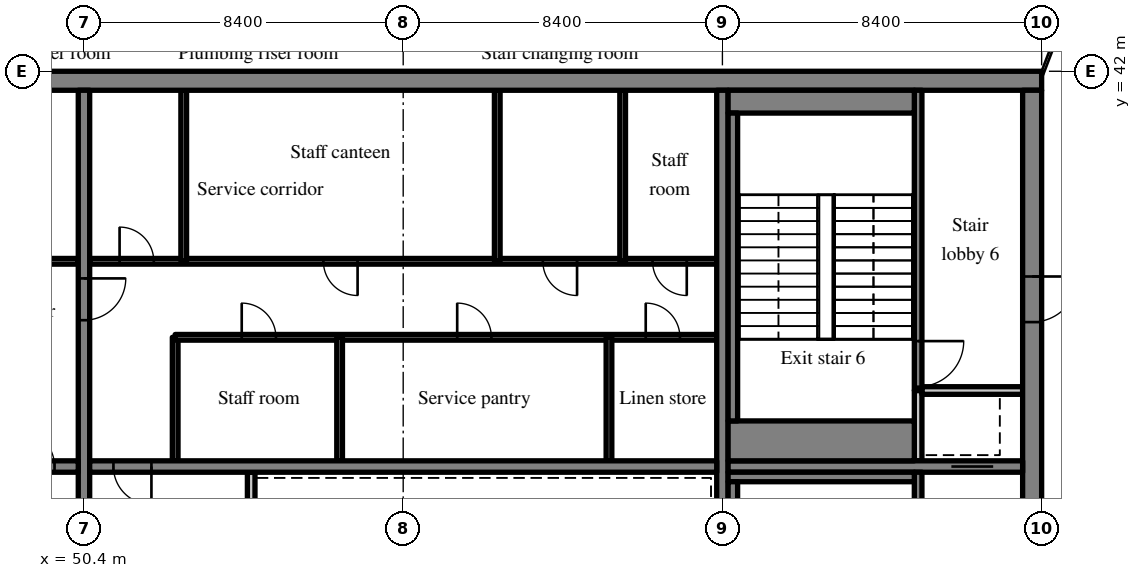
"""IFC4 building model, lengths in metres.
Left out: names, types, materials, properties, quantities, classifications, styles, units other than length and angle.
Written with IfcOpenShell. Run it as: python <this file> out.ifc"""

import sys

from ifc_helpers import new_model, si_unit, direction, frame, frame_2d, origin, place, context, subcontext, project, spatial, rectangle, extrude, source, transform, mapped, element, fill, save


model = new_model("IFC4")
c1 = context("Model", 3, precision=1e-05, world=origin(), true_north=direction((0.0, 1.0)))
c2 = subcontext(c1, "Body", "Model", "MODEL_VIEW")
j1 = project(units=[si_unit("LENGTHUNIT", "METRE"), si_unit("PLANEANGLEUNIT", "RADIAN")], contexts=[c1])
p1 = place(None, origin())
s1 = spatial("IfcSite", under=j1, at=p1, CompositionType="ELEMENT")
p2 = place(p1, origin())
s2 = spatial("IfcBuilding", under=s1, at=p2, CompositionType="ELEMENT")
p3 = place(p2, frame((0.0, 0.0, 289.7)))
s3 = spatial("IfcBuildingStorey", under=s2, at=p3, CompositionType="ELEMENT", Elevation=289.7)
m1 = source(origin(), c2, "Body", "SweptSolid", [
    extrude(rectangle(XDim=50.4, YDim=0.5, at=frame_2d((25.2, 0.0))), origin(), (0.0, 0.0, 1.0), 3.72),
])
p4 = place(p3, frame((25.2, 41.75, 0.0), z_axis=(0.0, 0.0, 1.0), x_axis=(1.0, 0.0, 0.0)))
e1 = element("IfcWall", 1, at=p4, inside=s3, PredefinedType="SHEAR", context=c2, shape_type="MappedRepresentation", body=[
    mapped(m1, transform((0.0, 0.0, 0.0), scale=1.0)),
])
m2 = source(origin(), c2, "Body", "SweptSolid", [
    extrude(rectangle(XDim=19.0, YDim=0.5, at=frame_2d((9.5, 0.0))), origin(), (0.0, 0.0, 1.0), 3.72),
])
p5 = place(p3, frame((75.35, 22.5, 0.0), z_axis=(0.0, 0.0, 1.0), x_axis=(0.0, 1.0, 0.0)))
e2 = element("IfcWall", 2, at=p5, inside=s3, PredefinedType="SHEAR", context=c2, shape_type="MappedRepresentation", body=[
    mapped(m2, transform((0.0, 0.0, 0.0), scale=1.0)),
])
m3 = source(origin(), c2, "Body", "SweptSolid", [
    extrude(rectangle(XDim=1.0, YDim=2.1, at=frame_2d((0.5, 1.05))), frame((0.0, 0.26, 0.0), z_axis=(0.0, -1.0, 0.0), x_axis=(1.0, 0.0, 0.0)), (0.0, 0.0, 1.0), 0.52),
])
p6 = place(p5, frame((3.0, 0.0, 0.0)))
e3 = element("IfcOpeningElement", 3, at=p6, cuts=e2, PredefinedType="OPENING", context=c2, shape_type="MappedRepresentation", body=[
    mapped(m3, transform((0.0, 0.0, 0.0), scale=1.0)),
])
m4 = source(origin(), c2, "Body", "SweptSolid", [
    extrude(rectangle(XDim=1.2, YDim=2.1, at=frame_2d((0.6, 1.05))), frame((0.0, 0.26, 0.0), z_axis=(0.0, -1.0, 0.0), x_axis=(1.0, 0.0, 0.0)), (0.0, 0.0, 1.0), 0.52),
])
p7 = place(p5, frame((12.9, 0.0, 0.0)))
e4 = element("IfcOpeningElement", 4, at=p7, cuts=e2, PredefinedType="OPENING", context=c2, shape_type="MappedRepresentation", body=[
    mapped(m4, transform((0.0, 0.0, 0.0), scale=1.0)),
])
m5 = source(origin(), c2, "Body", "SweptSolid", [
    extrude(rectangle(XDim=19.0, YDim=0.3, at=frame_2d((9.5, 0.0))), origin(), (0.0, 0.0, 1.0), 3.72),
])
p8 = place(p3, frame((50.4, 22.5, 0.0), z_axis=(0.0, 0.0, 1.0), x_axis=(0.0, 1.0, 0.0)))
e5 = element("IfcWall", 5, at=p8, inside=s3, PredefinedType="SHEAR", context=c2, shape_type="MappedRepresentation", body=[
    mapped(m5, transform((0.0, 0.0, 0.0), scale=1.0)),
])
m6 = source(origin(), c2, "Body", "SweptSolid", [
    extrude(rectangle(XDim=1.1, YDim=2.1, at=frame_2d((0.55, 1.05))), frame((0.0, 0.16, 0.0), z_axis=(0.0, -1.0, 0.0), x_axis=(1.0, 0.0, 0.0)), (0.0, 0.0, 1.0), 0.32),
])
p9 = place(p8, frame((12.95, 0.0, 0.0)))
e6 = element("IfcOpeningElement", 6, at=p9, cuts=e5, PredefinedType="OPENING", context=c2, shape_type="MappedRepresentation", body=[
    mapped(m6, transform((0.0, 0.0, 0.0), scale=1.0)),
])
p10 = place(p3, frame((67.2, 22.5, 0.0), z_axis=(0.0, 0.0, 1.0), x_axis=(0.0, 1.0, 0.0)))
e7 = element("IfcWall", 7, at=p10, inside=s3, PredefinedType="SHEAR", context=c2, shape_type="MappedRepresentation", body=[
    mapped(m5, transform((0.0, 0.0, 0.0), scale=1.0)),
])
m7 = source(origin(), c2, "Body", "SweptSolid", [
    extrude(rectangle(XDim=16.5, YDim=0.3, at=frame_2d((8.25, 0.0))), origin(), (0.0, 0.0, 1.0), 3.72),
])
p11 = place(p3, frame((33.75, 31.6, 0.0), z_axis=(0.0, 0.0, 1.0), x_axis=(1.0, 0.0, 0.0)))
e8 = element("IfcWall", 8, at=p11, inside=s3, PredefinedType="SHEAR", context=c2, shape_type="MappedRepresentation", body=[
    mapped(m7, transform((0.0, 0.0, 0.0), scale=1.0)),
])
m8 = source(origin(), c2, "Body", "SweptSolid", [
    extrude(rectangle(XDim=1.0, YDim=2.1, at=frame_2d((0.5, 1.05))), frame((0.0, 0.16, 0.0), z_axis=(0.0, -1.0, 0.0), x_axis=(1.0, 0.0, 0.0)), (0.0, 0.0, 1.0), 0.32),
])
p12 = place(p11, frame((14.875, 0.0, 0.0)))
e9 = element("IfcOpeningElement", 9, at=p12, cuts=e8, PredefinedType="OPENING", context=c2, shape_type="MappedRepresentation", body=[
    mapped(m8, transform((0.0, 0.0, 0.0), scale=1.0)),
])
p13 = place(p3, frame((50.55, 31.6, 0.0), z_axis=(0.0, 0.0, 1.0), x_axis=(1.0, 0.0, 0.0)))
e10 = element("IfcWall", 10, at=p13, inside=s3, PredefinedType="SHEAR", context=c2, shape_type="MappedRepresentation", body=[
    mapped(m7, transform((0.0, 0.0, 0.0), scale=1.0)),
])
p14 = place(p13, frame((0.625, 0.0, 0.0)))
e11 = element("IfcOpeningElement", 11, at=p14, cuts=e10, PredefinedType="OPENING", context=c2, shape_type="MappedRepresentation", body=[
    mapped(m8, transform((0.0, 0.0, 0.0), scale=1.0)),
])
m9 = source(origin(), c2, "Body", "SweptSolid", [
    extrude(rectangle(XDim=7.75, YDim=0.3, at=frame_2d((3.875, 0.0))), origin(), (0.0, 0.0, 1.0), 3.72),
])
p15 = place(p3, frame((67.35, 31.6, 0.0), z_axis=(0.0, 0.0, 1.0), x_axis=(1.0, 0.0, 0.0)))
e12 = element("IfcWall", 12, at=p15, inside=s3, PredefinedType="SHEAR", context=c2, shape_type="MappedRepresentation", body=[
    mapped(m9, transform((0.0, 0.0, 0.0), scale=1.0)),
])
p16 = place(p15, frame((5.875, 0.0, 0.0)))
e13 = element("IfcOpeningElement", 13, at=p16, cuts=e12, PredefinedType="OPENING", context=c2, shape_type="MappedRepresentation", body=[
    mapped(m6, transform((0.0, 0.0, 0.0), scale=1.0)),
])
m10 = source(origin(), c2, "Body", "SweptSolid", [
    extrude(rectangle(XDim=16.5, YDim=0.15, at=frame_2d((8.25, 0.0))), origin(), (0.0, 0.0, 1.0), 3.72),
])
p17 = place(p3, frame((33.75, 37.0, 0.0), z_axis=(0.0, 0.0, 1.0), x_axis=(1.0, 0.0, 0.0)))
e14 = element("IfcWall", 14, at=p17, inside=s3, PredefinedType="PARTITIONING", context=c2, shape_type="MappedRepresentation", body=[
    mapped(m10, transform((0.0, 0.0, 0.0), scale=1.0)),
])
m11 = source(origin(), c2, "Body", "SweptSolid", [
    extrude(rectangle(XDim=0.9, YDim=2.1, at=frame_2d((0.45, 1.05))), frame((0.0, 0.085, 0.0), z_axis=(0.0, -1.0, 0.0), x_axis=(1.0, 0.0, 0.0)), (0.0, 0.0, 1.0), 0.17),
])
p18 = place(p17, frame((3.262, 0.0, 0.0)))
e15 = element("IfcOpeningElement", 15, at=p18, cuts=e14, PredefinedType="OPENING", context=c2, shape_type="MappedRepresentation", body=[
    mapped(m11, transform((0.0, 0.0, 0.0), scale=1.0)),
])
p19 = place(p17, frame((8.212, 0.0, 0.0)))
e16 = element("IfcOpeningElement", 16, at=p19, cuts=e14, PredefinedType="OPENING", context=c2, shape_type="MappedRepresentation", body=[
    mapped(m11, transform((0.0, 0.0, 0.0), scale=1.0)),
])
p20 = place(p17, frame((11.512, 0.0, 0.0)))
e17 = element("IfcOpeningElement", 17, at=p20, cuts=e14, PredefinedType="OPENING", context=c2, shape_type="MappedRepresentation", body=[
    mapped(m11, transform((0.0, 0.0, 0.0), scale=1.0)),
])
p21 = place(p17, frame((14.813, 0.0, 0.0)))
e18 = element("IfcOpeningElement", 18, at=p21, cuts=e14, PredefinedType="OPENING", context=c2, shape_type="MappedRepresentation", body=[
    mapped(m11, transform((0.0, 0.0, 0.0), scale=1.0)),
])
m12 = source(origin(), c2, "Body", "SweptSolid", [
    extrude(rectangle(XDim=2.65, YDim=0.2, at=frame_2d((1.325, 0.0))), origin(), (0.0, 0.0, 1.0), 3.72),
])
p22 = place(p3, frame((54.8, 28.8, 0.0), z_axis=(0.0, 0.0, 1.0), x_axis=(0.0, 1.0, 0.0)))
e19 = element("IfcWall", 19, at=p22, inside=s3, PredefinedType="SOLIDWALL", context=c2, shape_type="MappedRepresentation", body=[
    mapped(m12, transform((0.0, 0.0, 0.0), scale=1.0)),
])
m13 = source(origin(), c2, "Body", "SweptSolid", [
    extrude(rectangle(XDim=3.25, YDim=0.15, at=frame_2d((1.625, 0.0))), origin(), (0.0, 0.0, 1.0), 3.72),
])
p23 = place(p3, frame((52.8, 31.75, 0.0), z_axis=(0.0, 0.0, 1.0), x_axis=(0.0, 1.0, 0.0)))
e20 = element("IfcWall", 20, at=p23, inside=s3, PredefinedType="PARTITIONING", context=c2, shape_type="MappedRepresentation", body=[
    mapped(m13, transform((0.0, 0.0, 0.0), scale=1.0)),
])
m14 = source(origin(), c2, "Body", "SweptSolid", [
    extrude(rectangle(XDim=14.25, YDim=0.15, at=frame_2d((7.125, 0.0))), origin(), (0.0, 0.0, 1.0), 3.72),
])
p24 = place(p3, frame((67.05, 35.0, 0.0), z_axis=(0.0, 0.0, 1.0), x_axis=(-1.0, 0.0, 0.0)))
e21 = element("IfcWall", 21, at=p24, inside=s3, PredefinedType="PARTITIONING", context=c2, shape_type="MappedRepresentation", body=[
    mapped(m14, transform((0.0, 0.0, 0.0), scale=1.0)),
])
p25 = place(p24, frame((0.968, 0.0, 0.0)))
e22 = element("IfcOpeningElement", 22, at=p25, cuts=e21, PredefinedType="OPENING", context=c2, shape_type="MappedRepresentation", body=[
    mapped(m11, transform((0.0, 0.0, 0.0), scale=1.0)),
])
p26 = place(p24, frame((5.929, 0.0, 0.0)))
e23 = element("IfcOpeningElement", 23, at=p26, cuts=e21, PredefinedType="OPENING", context=c2, shape_type="MappedRepresentation", body=[
    mapped(m11, transform((0.0, 0.0, 0.0), scale=1.0)),
])
p27 = place(p24, frame((11.599, 0.0, 0.0)))
e24 = element("IfcOpeningElement", 24, at=p27, cuts=e21, PredefinedType="OPENING", context=c2, shape_type="MappedRepresentation", body=[
    mapped(m11, transform((0.0, 0.0, 0.0), scale=1.0)),
])
p28 = place(p3, frame((67.05, 37.0, 0.0), z_axis=(0.0, 0.0, 1.0), x_axis=(-1.0, 0.0, 0.0)))
e25 = element("IfcWall", 25, at=p28, inside=s3, PredefinedType="PARTITIONING", context=c2, shape_type="MappedRepresentation", body=[
    mapped(m10, transform((0.0, 0.0, 0.0), scale=1.0)),
])
p29 = place(p28, frame((0.788, 0.0, 0.0)))
e26 = element("IfcOpeningElement", 26, at=p29, cuts=e25, PredefinedType="OPENING", context=c2, shape_type="MappedRepresentation", body=[
    mapped(m11, transform((0.0, 0.0, 0.0), scale=1.0)),
])
p30 = place(p28, frame((3.675, 0.0, 0.0)))
e27 = element("IfcOpeningElement", 27, at=p30, cuts=e25, PredefinedType="OPENING", context=c2, shape_type="MappedRepresentation", body=[
    mapped(m11, transform((0.0, 0.0, 0.0), scale=1.0)),
])
p31 = place(p28, frame((9.45, 0.0, 0.0)))
e28 = element("IfcOpeningElement", 28, at=p31, cuts=e25, PredefinedType="OPENING", context=c2, shape_type="MappedRepresentation", body=[
    mapped(m11, transform((0.0, 0.0, 0.0), scale=1.0)),
])
p32 = place(p28, frame((14.813, 0.0, 0.0)))
e29 = element("IfcOpeningElement", 29, at=p32, cuts=e25, PredefinedType="OPENING", context=c2, shape_type="MappedRepresentation", body=[
    mapped(m11, transform((0.0, 0.0, 0.0), scale=1.0)),
])
for number, where, z_axis, x_axis in (
    (30, (64.215, 31.75, 0.0), (0.0, 0.0, 1.0), (0.0, 1.0, 0.0)),
    (31, (57.127, 31.75, 0.0), (0.0, 0.0, 1.0), (0.0, 1.0, 0.0)),
):
    element("IfcWall", number, at=place(p3, frame(where, z_axis=z_axis, x_axis=x_axis)), inside=s3, PredefinedType="PARTITIONING", context=c2, shape_type="MappedRepresentation", body=[
        mapped(m13, transform((0.0, 0.0, 0.0), scale=1.0)),
    ])
m15 = source(origin(), c2, "Body", "SweptSolid", [
    extrude(rectangle(XDim=4.5, YDim=0.15, at=frame_2d((2.25, 0.0))), origin(), (0.0, 0.0, 1.0), 3.72),
])
for number, where, z_axis, x_axis in (
    (32, (64.575, 37.0, 0.0), (0.0, 0.0, 1.0), (0.0, 1.0, 0.0)),
    (33, (61.275, 37.0, 0.0), (0.0, 0.0, 1.0), (0.0, 1.0, 0.0)),
    (34, (53.025, 37.0, 0.0), (0.0, 0.0, 1.0), (0.0, 1.0, 0.0)),
):
    element("IfcWall", number, at=place(p3, frame(where, z_axis=z_axis, x_axis=x_axis)), inside=s3, PredefinedType="PARTITIONING", context=c2, shape_type="MappedRepresentation", body=[
        mapped(m15, transform((0.0, 0.0, 0.0), scale=1.0)),
    ])
m16 = source(origin(), c2, "Body", "SweptSolid", [
    extrude(rectangle(XDim=8.95, YDim=0.2, at=frame_2d((4.475, 0.0))), origin(), (0.0, 0.0, 1.0), 3.72),
])
p33 = place(p3, frame((72.35, 22.5, 0.0), z_axis=(0.0, 0.0, 1.0), x_axis=(0.0, 1.0, 0.0)))
e35 = element("IfcWall", 35, at=p33, inside=s3, PredefinedType="SOLIDWALL", context=c2, shape_type="MappedRepresentation", body=[
    mapped(m16, transform((0.0, 0.0, 0.0), scale=1.0)),
])
m17 = source(origin(), c2, "Body", "SweptSolid", [
    extrude(rectangle(XDim=1.2, YDim=2.1, at=frame_2d((0.6, 1.05))), frame((0.0, 0.11, 0.0), z_axis=(0.0, -1.0, 0.0), x_axis=(1.0, 0.0, 0.0)), (0.0, 0.0, 1.0), 0.22),
])
p34 = place(p33, frame((1.1, 0.0, 0.0)))
e36 = element("IfcOpeningElement", 36, at=p34, cuts=e35, PredefinedType="OPENING", context=c2, shape_type="MappedRepresentation", body=[
    mapped(m17, transform((0.0, 0.0, 0.0), scale=1.0)),
])
m18 = source(origin(), c2, "Body", "SweptSolid", [
    extrude(rectangle(XDim=1.85, YDim=0.2, at=frame_2d((0.925, 0.0))), origin(), (0.0, 0.0, 1.0), 3.72),
])
p35 = place(p3, frame((72.35, 31.75, 0.0), z_axis=(0.0, 0.0, 1.0), x_axis=(0.0, 1.0, 0.0)))
e37 = element("IfcWall", 37, at=p35, inside=s3, PredefinedType="SOLIDWALL", context=c2, shape_type="MappedRepresentation", body=[
    mapped(m18, transform((0.0, 0.0, 0.0), scale=1.0)),
])
m19 = source(origin(), c2, "Body", "SweptSolid", [
    extrude(rectangle(XDim=2.65, YDim=0.2, at=frame_2d((1.325, 0.0))), origin(), (0.0, 0.0, 1.0), 3.72),
])
p36 = place(p3, frame((72.45, 33.6, 0.0), z_axis=(0.0, 0.0, 1.0), x_axis=(1.0, 0.0, 0.0)))
e38 = element("IfcWall", 38, at=p36, inside=s3, PredefinedType="SOLIDWALL", context=c2, shape_type="MappedRepresentation", body=[
    mapped(m19, transform((0.0, 0.0, 0.0), scale=1.0)),
])
m20 = source(origin(), c2, "Body", "SweptSolid", [
    extrude(rectangle(XDim=7.9, YDim=0.2, at=frame_2d((3.95, 0.0))), origin(), (0.0, 0.0, 1.0), 3.72),
])
p37 = place(p3, frame((72.35, 33.6, 0.0), z_axis=(0.0, 0.0, 1.0), x_axis=(0.0, 1.0, 0.0)))
e39 = element("IfcWall", 39, at=p37, inside=s3, PredefinedType="SOLIDWALL", context=c2, shape_type="MappedRepresentation", body=[
    mapped(m20, transform((0.0, 0.0, 0.0), scale=1.0)),
])
p38 = place(p37, frame((0.1, 0.0, 0.0)))
e40 = element("IfcOpeningElement", 40, at=p38, cuts=e39, PredefinedType="OPENING", context=c2, shape_type="MappedRepresentation", body=[
    mapped(m17, transform((0.0, 0.0, 0.0), scale=1.0)),
])
m21 = source(origin(), c2, "Body", "SweptSolid", [
    extrude(rectangle(XDim=4.9, YDim=0.25, at=frame_2d((2.45, 0.0))), origin(), (0.0, 0.0, 1.0), 3.72),
])
p39 = place(p3, frame((67.35, 31.325, 0.0), z_axis=(0.0, 0.0, 1.0), x_axis=(1.0, 0.0, 0.0)))
e41 = element("IfcWall", 41, at=p39, inside=s3, PredefinedType="SOLIDWALL", context=c2, shape_type="MappedRepresentation", body=[
    mapped(m21, transform((0.0, 0.0, 0.0), scale=1.0)),
])
m22 = source(origin(), c2, "Body", "SweptSolid", [
    extrude(rectangle(XDim=8.1, YDim=0.25, at=frame_2d((4.05, 0.0))), origin(), (0.0, 0.0, 1.0), 3.72),
])
p40 = place(p3, frame((67.475, 23.1, 0.0), z_axis=(0.0, 0.0, 1.0), x_axis=(0.0, 1.0, 0.0)))
e42 = element("IfcWall", 42, at=p40, inside=s3, PredefinedType="SOLIDWALL", context=c2, shape_type="MappedRepresentation", body=[
    mapped(m22, transform((0.0, 0.0, 0.0), scale=1.0)),
])
m23 = source(origin(), c2, "Body", "SweptSolid", [
    extrude(rectangle(XDim=4.9, YDim=0.6, at=frame_2d((2.45, 0.0))), origin(), (0.0, 0.0, 1.0), 3.72),
])
p41 = place(p3, frame((67.35, 41.2, 0.0), z_axis=(0.0, 0.0, 1.0), x_axis=(1.0, 0.0, 0.0)))
e43 = element("IfcWall", 43, at=p41, inside=s3, PredefinedType="SOLIDWALL", context=c2, shape_type="MappedRepresentation", body=[
    mapped(m23, transform((0.0, 0.0, 0.0), scale=1.0)),
])
m24 = source(origin(), c2, "Body", "SweptSolid", [
    extrude(rectangle(XDim=4.9, YDim=1.05, at=frame_2d((2.45, 0.0))), origin(), (0.0, 0.0, 1.0), 3.72),
])
p42 = place(p3, frame((67.35, 32.275, 0.0), z_axis=(0.0, 0.0, 1.0), x_axis=(1.0, 0.0, 0.0)))
e44 = element("IfcWall", 44, at=p42, inside=s3, PredefinedType="SOLIDWALL", context=c2, shape_type="MappedRepresentation", body=[
    mapped(m24, transform((0.0, 0.0, 0.0), scale=1.0)),
])
p43 = place(p3, frame((67.475, 32.8, 0.0), z_axis=(0.0, 0.0, 1.0), x_axis=(0.0, 1.0, 0.0)))
e45 = element("IfcWall", 45, at=p43, inside=s3, PredefinedType="SOLIDWALL", context=c2, shape_type="MappedRepresentation", body=[
    mapped(m22, transform((0.0, 0.0, 0.0), scale=1.0)),
])
m25 = source(origin(), c2, "Body", "SweptSolid", [
    extrude(rectangle(XDim=1.0, YDim=2.1, at=frame_2d((0.5, 1.05))), frame((0.0, 0.025, 0.0), z_axis=(0.0, -1.0, 0.0), x_axis=(1.0, 0.0, 0.0)), (0.0, 0.0, 1.0), 0.05),
])
p44 = place(p12, origin())
e46 = element("IfcDoor", 46, at=p44, inside=s3, OperationType="SINGLE_SWING_LEFT", PredefinedType="DOOR", context=c2, shape_type="MappedRepresentation", body=[
    mapped(m25, transform((0.0, 0.0, 0.0), scale=1.0)),
])
fill(e9, e46)
p45 = place(p14, origin())
e47 = element("IfcDoor", 47, at=p45, inside=s3, OperationType="SINGLE_SWING_RIGHT", PredefinedType="DOOR", context=c2, shape_type="MappedRepresentation", body=[
    mapped(m25, transform((0.0, 0.0, 0.0), scale=1.0)),
])
fill(e11, e47)
m26 = source(origin(), c2, "Body", "SweptSolid", [
    extrude(rectangle(XDim=0.9, YDim=2.1, at=frame_2d((0.45, 1.05))), frame((0.0, 0.025, 0.0), z_axis=(0.0, -1.0, 0.0), x_axis=(1.0, 0.0, 0.0)), (0.0, 0.0, 1.0), 0.05),
])
p46 = place(p25, origin())
e48 = element("IfcDoor", 48, at=p46, inside=s3, OperationType="SINGLE_SWING_RIGHT", PredefinedType="DOOR", context=c2, shape_type="MappedRepresentation", body=[
    mapped(m26, transform((0.0, 0.0, 0.0), scale=1.0)),
])
fill(e22, e48)
p47 = place(p26, origin())
e49 = element("IfcDoor", 49, at=p47, inside=s3, OperationType="SINGLE_SWING_RIGHT", PredefinedType="DOOR", context=c2, shape_type="MappedRepresentation", body=[
    mapped(m26, transform((0.0, 0.0, 0.0), scale=1.0)),
])
fill(e23, e49)
p48 = place(p27, origin())
e50 = element("IfcDoor", 50, at=p48, inside=s3, OperationType="SINGLE_SWING_RIGHT", PredefinedType="DOOR", context=c2, shape_type="MappedRepresentation", body=[
    mapped(m26, transform((0.0, 0.0, 0.0), scale=1.0)),
])
fill(e24, e50)
p49 = place(p29, origin())
e51 = element("IfcDoor", 51, at=p49, inside=s3, OperationType="SINGLE_SWING_LEFT", PredefinedType="DOOR", context=c2, shape_type="MappedRepresentation", body=[
    mapped(m26, transform((0.0, 0.0, 0.0), scale=1.0)),
])
fill(e26, e51)
p50 = place(p30, origin())
e52 = element("IfcDoor", 52, at=p50, inside=s3, OperationType="SINGLE_SWING_LEFT", PredefinedType="DOOR", context=c2, shape_type="MappedRepresentation", body=[
    mapped(m26, transform((0.0, 0.0, 0.0), scale=1.0)),
])
fill(e27, e52)
p51 = place(p31, origin())
e53 = element("IfcDoor", 53, at=p51, inside=s3, OperationType="SINGLE_SWING_LEFT", PredefinedType="DOOR", context=c2, shape_type="MappedRepresentation", body=[
    mapped(m26, transform((0.0, 0.0, 0.0), scale=1.0)),
])
fill(e28, e53)
p52 = place(p32, origin())
e54 = element("IfcDoor", 54, at=p52, inside=s3, OperationType="SINGLE_SWING_RIGHT", PredefinedType="DOOR", context=c2, shape_type="MappedRepresentation", body=[
    mapped(m26, transform((0.0, 0.0, 0.0), scale=1.0)),
])
fill(e29, e54)
m27 = source(origin(), c2, "Body", "SweptSolid", [
    extrude(rectangle(XDim=1.1, YDim=2.1, at=frame_2d((0.55, 1.05))), frame((0.0, 0.025, 0.0), z_axis=(0.0, -1.0, 0.0), x_axis=(1.0, 0.0, 0.0)), (0.0, 0.0, 1.0), 0.05),
])
p53 = place(p16, origin())
e55 = element("IfcDoor", 55, at=p53, inside=s3, OperationType="SLIDING_TO_LEFT", PredefinedType="DOOR", context=c2, shape_type="MappedRepresentation", body=[
    mapped(m27, transform((0.0, 0.0, 0.0), scale=1.0)),
])
fill(e13, e55)
m28 = source(origin(), c2, "Body", "SweptSolid", [
    extrude(rectangle(XDim=1.2, YDim=2.1, at=frame_2d((0.6, 1.05))), frame((0.0, 0.025, 0.0), z_axis=(0.0, -1.0, 0.0), x_axis=(1.0, 0.0, 0.0)), (0.0, 0.0, 1.0), 0.05),
])
p54 = place(p38, origin())
e56 = element("IfcDoor", 56, at=p54, inside=s3, OperationType="SINGLE_SWING_RIGHT", PredefinedType="DOOR", context=c2, shape_type="MappedRepresentation", body=[
    mapped(m28, transform((0.0, 0.0, 0.0), scale=1.0)),
])
fill(e40, e56)
p55 = place(p7, origin())
e57 = element("IfcDoor", 57, at=p55, inside=s3, OperationType="SINGLE_SWING_RIGHT", PredefinedType="DOOR", context=c2, shape_type="MappedRepresentation", body=[
    mapped(m28, transform((0.0, 0.0, 0.0), scale=1.0)),
])
fill(e4, e57)
p56 = place(p9, origin())
e58 = element("IfcDoor", 58, at=p56, inside=s3, OperationType="SINGLE_SWING_RIGHT", PredefinedType="DOOR", context=c2, shape_type="MappedRepresentation", body=[
    mapped(m27, transform((0.0, 0.0, 0.0), scale=1.0)),
])
fill(e6, e58)
save(model, sys.argv[1])
